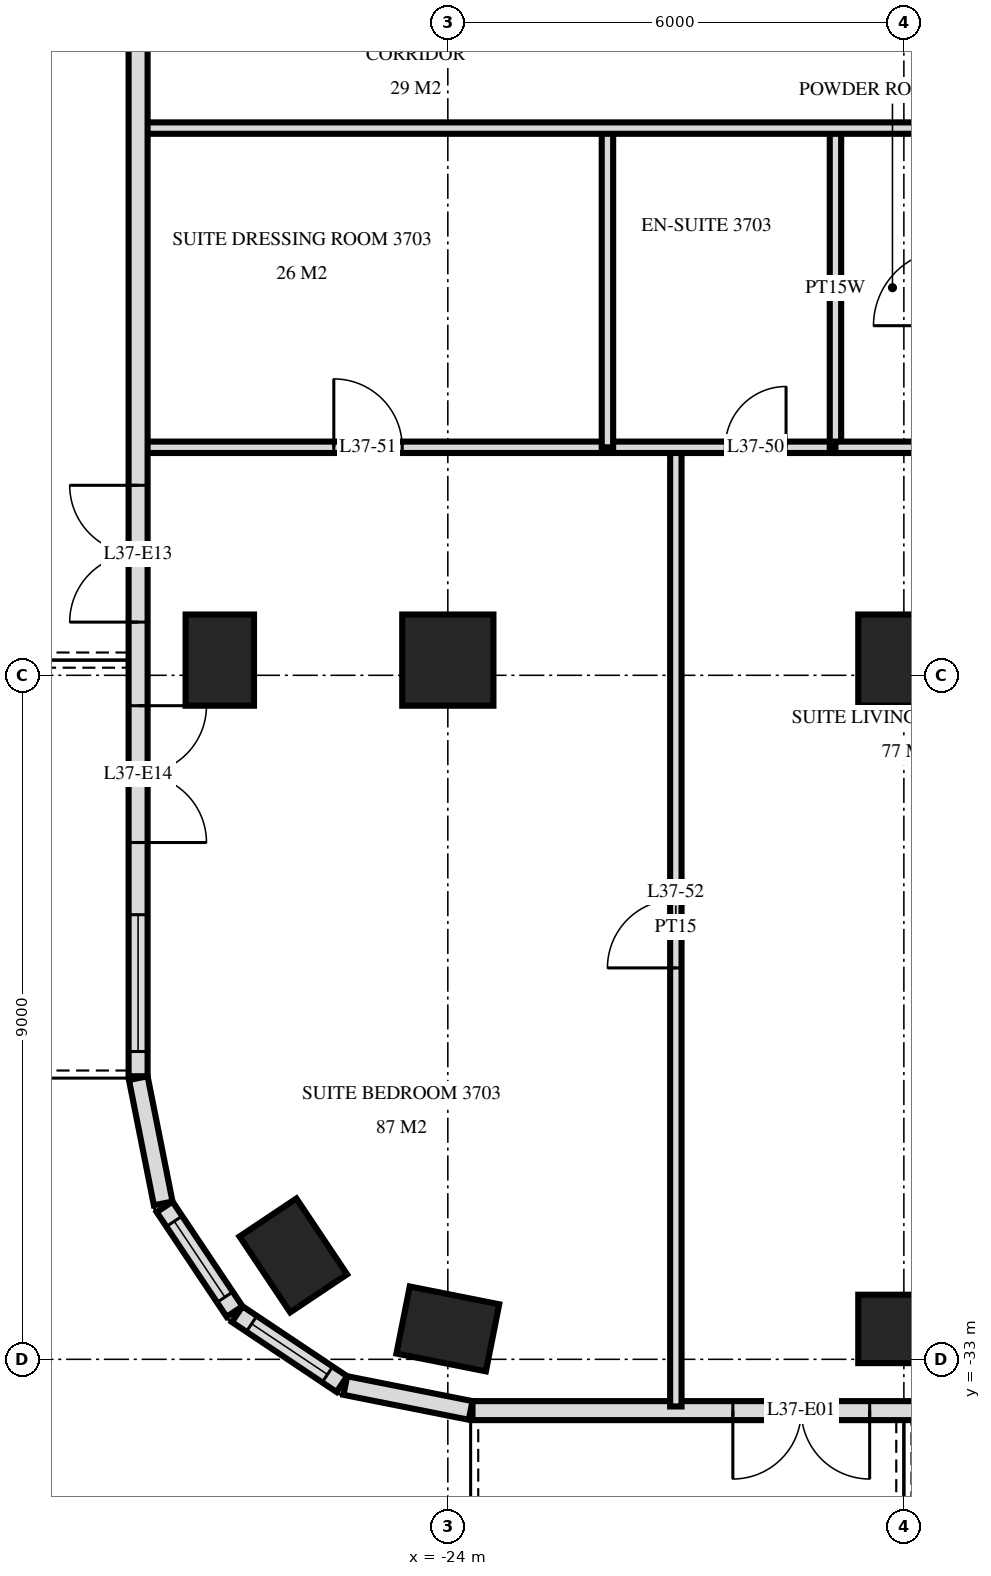
"""IFC4 building model, lengths in metres.
Left out: names, types, materials, properties, quantities, classifications, styles, units other than length and angle.
Written with IfcOpenShell. Run it as: python <this file> out.ifc"""

import sys

from ifc_helpers import new_model, si_unit, direction, frame, frame_2d, origin, origin_2d, place, context, subcontext, project, spatial, rectangle, extrude, element, fill, save


model = new_model("IFC4")
c1 = context("Model", 3, precision=1e-05, world=origin(), true_north=direction((0.0, 1.0)))
c2 = subcontext(c1, "Body", "Model", "MODEL_VIEW")
j1 = project(units=[si_unit("LENGTHUNIT", "METRE"), si_unit("PLANEANGLEUNIT", "RADIAN")], contexts=[c1])
p1 = place(None, origin())
s1 = spatial("IfcSite", under=j1, at=p1, CompositionType="ELEMENT")
p2 = place(p1, origin())
s2 = spatial("IfcBuilding", under=s1, at=p2, CompositionType="ELEMENT")
p3 = place(p2, frame((0.0, 0.0, 145.2)))
s3 = spatial("IfcBuildingStorey", under=s2, at=p3, CompositionType="ELEMENT", Elevation=145.2)
for number, where, z_axis, x_axis in (
    (1, (-27.0, -23.8, 0.0), (0.0, 0.0, 1.0), (0.0, 1.0, 0.0)),
    (2, (-26.033, -31.633, 0.0), (0.0, 0.0, 1.0), (-0.556, 0.831, 0.0)),
    (3, (-24.0, -32.6, 0.0), (0.0, 0.0, 1.0), (-0.981, 0.195, 0.0)),
):
    element("IfcColumn", number, at=place(p3, frame(where, z_axis=z_axis, x_axis=x_axis)), inside=s3, PredefinedType="COLUMN", context=c2, shape_type="SweptSolid", body=[
        extrude(rectangle(XDim=1.2, YDim=0.9, at=origin_2d()), origin(), (0.0, 0.0, 1.0), 3.6),
    ])
p4 = place(p3, frame((-24.0, -23.8, 0.0), z_axis=(0.0, 0.0, 1.0), x_axis=(1.0, 0.0, 0.0)))
e4 = element("IfcColumn", 4, at=p4, inside=s3, PredefinedType="COLUMN", context=c2, shape_type="SweptSolid", body=[
    extrude(rectangle(XDim=1.2, YDim=1.2, at=origin_2d()), origin(), (0.0, 0.0, 1.0), 3.6),
])
p5 = place(p3, frame((-18.0, -32.6, 0.0), z_axis=(0.0, 0.0, 1.0), x_axis=(1.0, 0.0, 0.0)))
e5 = element("IfcColumn", 5, at=p5, inside=s3, PredefinedType="COLUMN", context=c2, shape_type="SweptSolid", body=[
    extrude(rectangle(XDim=1.2, YDim=0.9, at=origin_2d()), origin(), (0.0, 0.0, 1.0), 3.6),
])
p6 = place(p3, frame((-18.0, -23.8, 0.0), z_axis=(0.0, 0.0, 1.0), x_axis=(1.0, 0.0, 0.0)))
e6 = element("IfcColumn", 6, at=p6, inside=s3, PredefinedType="COLUMN", context=c2, shape_type="SweptSolid", body=[
    extrude(rectangle(XDim=1.2, YDim=1.2, at=origin_2d()), origin(), (0.0, 0.0, 1.0), 3.6),
])
p7 = place(p3, frame((-28.075, -3.325, 0.0), z_axis=(0.0, 0.0, 1.0), x_axis=(0.0, -1.0, 0.0)))
e7 = element("IfcWall", 7, at=p7, inside=s3, PredefinedType="SOLIDWALL", context=c2, shape_type="SweptSolid", body=[
    extrude(rectangle(XDim=25.951, YDim=0.25, at=frame_2d((12.975, 0.0))), origin(), (0.0, 0.0, 1.0), 3.32),
])
p8 = place(p7, frame((7.275, 0.0, 0.0)))
e8 = element("IfcOpeningElement", 8, at=p8, cuts=e7, PredefinedType="OPENING", context=c2, shape_type="SweptSolid", body=[
    extrude(rectangle(XDim=1.8, YDim=2.4, at=frame_2d((0.9, 1.2))), frame((0.0, 0.135, 0.0), z_axis=(0.0, -1.0, 0.0), x_axis=(1.0, 0.0, 0.0)), (0.0, 0.0, 1.0), 0.27),
])
p9 = place(p7, frame((18.175, 0.0, 0.0)))
e9 = element("IfcOpeningElement", 9, at=p9, cuts=e7, PredefinedType="OPENING", context=c2, shape_type="SweptSolid", body=[
    extrude(rectangle(XDim=1.8, YDim=2.4, at=frame_2d((0.9, 1.2))), frame((0.0, 0.135, 0.0), z_axis=(0.0, -1.0, 0.0), x_axis=(1.0, 0.0, 0.0)), (0.0, 0.0, 1.0), 0.27),
])
p10 = place(p7, frame((21.075, 0.0, 0.0)))
e10 = element("IfcOpeningElement", 10, at=p10, cuts=e7, PredefinedType="OPENING", context=c2, shape_type="SweptSolid", body=[
    extrude(rectangle(XDim=1.8, YDim=2.4, at=frame_2d((0.9, 1.2))), frame((0.0, 0.135, 0.0), z_axis=(0.0, -1.0, 0.0), x_axis=(1.0, 0.0, 0.0)), (0.0, 0.0, 1.0), 0.27),
])
p11 = place(p7, frame((23.825, 0.0, 0.3)))
e11 = element("IfcOpeningElement", 11, at=p11, cuts=e7, PredefinedType="OPENING", context=c2, shape_type="SweptSolid", body=[
    extrude(rectangle(XDim=1.8, YDim=2.1, at=frame_2d((0.9, 1.05))), frame((0.0, 0.135, 0.0), z_axis=(0.0, -1.0, 0.0), x_axis=(1.0, 0.0, 0.0)), (0.0, 0.0, 1.0), 0.27),
])
p12 = place(p3, frame((-28.073, -29.3, 0.0), z_axis=(0.0, 0.0, 1.0), x_axis=(0.194999110559, -0.980803419081, 0.0)))
e12 = element("IfcWall", 12, at=p12, inside=s3, PredefinedType="SOLIDWALL", context=c2, shape_type="SweptSolid", body=[
    extrude(rectangle(XDim=1.681, YDim=0.25, at=frame_2d((0.841, 0.0))), origin(), (0.0, 0.0, 1.0), 3.32),
])
p13 = place(p3, frame((-27.726, -30.994, 0.0), z_axis=(0.0, 0.0, 1.0), x_axis=(0.55555029066, -0.831482937015, 0.0)))
e13 = element("IfcWall", 13, at=p13, inside=s3, PredefinedType="SOLIDWALL", context=c2, shape_type="SweptSolid", body=[
    extrude(rectangle(XDim=1.656, YDim=0.25, at=frame_2d((0.828, 0.0))), origin(), (0.0, 0.0, 1.0), 3.32),
])
p14 = place(p13, frame((0.228, 0.0, 0.9)))
e14 = element("IfcOpeningElement", 14, at=p14, cuts=e13, PredefinedType="OPENING", context=c2, shape_type="SweptSolid", body=[
    extrude(rectangle(XDim=1.2, YDim=1.5, at=frame_2d((0.6, 0.75))), frame((0.0, 0.135, 0.0), z_axis=(0.0, -1.0, 0.0), x_axis=(1.0, 0.0, 0.0)), (0.0, 0.0, 1.0), 0.27),
])
p15 = place(p3, frame((-26.771, -32.406, 0.0), z_axis=(0.0, 0.0, 1.0), x_axis=(0.831482937015, -0.55555029066, 0.0)))
e15 = element("IfcWall", 15, at=p15, inside=s3, PredefinedType="SOLIDWALL", context=c2, shape_type="SweptSolid", body=[
    extrude(rectangle(XDim=1.656, YDim=0.25, at=frame_2d((0.828, 0.0))), origin(), (0.0, 0.0, 1.0), 3.32),
])
p16 = place(p15, frame((0.228, 0.0, 0.9)))
e16 = element("IfcOpeningElement", 16, at=p16, cuts=e15, PredefinedType="OPENING", context=c2, shape_type="SweptSolid", body=[
    extrude(rectangle(XDim=1.2, YDim=1.5, at=frame_2d((0.6, 0.75))), frame((0.0, 0.135, 0.0), z_axis=(0.0, -1.0, 0.0), x_axis=(1.0, 0.0, 0.0)), (0.0, 0.0, 1.0), 0.27),
])
p17 = place(p3, frame((-25.349, -33.344, 0.0), z_axis=(0.0, 0.0, 1.0), x_axis=(0.980775640221, -0.19513878023, 0.0)))
e17 = element("IfcWall", 17, at=p17, inside=s3, PredefinedType="SOLIDWALL", context=c2, shape_type="SweptSolid", body=[
    extrude(rectangle(XDim=1.681, YDim=0.25, at=frame_2d((0.841, 0.0))), origin(), (0.0, 0.0, 1.0), 3.32),
])
p18 = place(p3, frame((-23.675, -33.675, 0.0), z_axis=(0.0, 0.0, 1.0), x_axis=(1.0, 0.0, 0.0)))
e18 = element("IfcWall", 18, at=p18, inside=s3, PredefinedType="SOLIDWALL", context=c2, shape_type="SweptSolid", body=[
    extrude(rectangle(XDim=47.351, YDim=0.25, at=frame_2d((23.675, 0.0))), origin(), (0.0, 0.0, 1.0), 3.32),
])
p19 = place(p18, frame((3.425, 0.0, 0.0)))
e19 = element("IfcOpeningElement", 19, at=p19, cuts=e18, PredefinedType="OPENING", context=c2, shape_type="SweptSolid", body=[
    extrude(rectangle(XDim=1.8, YDim=2.4, at=frame_2d((0.9, 1.2))), frame((0.0, 0.135, 0.0), z_axis=(0.0, -1.0, 0.0), x_axis=(1.0, 0.0, 0.0)), (0.0, 0.0, 1.0), 0.27),
])
p20 = place(p18, frame((6.275, 0.0, 0.0)))
e20 = element("IfcOpeningElement", 20, at=p20, cuts=e18, PredefinedType="OPENING", context=c2, shape_type="SweptSolid", body=[
    extrude(rectangle(XDim=1.8, YDim=2.4, at=frame_2d((0.9, 1.2))), frame((0.0, 0.135, 0.0), z_axis=(0.0, -1.0, 0.0), x_axis=(1.0, 0.0, 0.0)), (0.0, 0.0, 1.0), 0.27),
])
p21 = place(p18, frame((8.975, 0.0, 0.3)))
e21 = element("IfcOpeningElement", 21, at=p21, cuts=e18, PredefinedType="OPENING", context=c2, shape_type="SweptSolid", body=[
    extrude(rectangle(XDim=2.4, YDim=2.1, at=frame_2d((1.2, 1.05))), frame((0.0, 0.135, 0.0), z_axis=(0.0, -1.0, 0.0), x_axis=(1.0, 0.0, 0.0)), (0.0, 0.0, 1.0), 0.27),
])
p22 = place(p18, frame((12.275, 0.0, 0.0)))
e22 = element("IfcOpeningElement", 22, at=p22, cuts=e18, PredefinedType="OPENING", context=c2, shape_type="SweptSolid", body=[
    extrude(rectangle(XDim=1.8, YDim=2.4, at=frame_2d((0.9, 1.2))), frame((0.0, 0.135, 0.0), z_axis=(0.0, -1.0, 0.0), x_axis=(1.0, 0.0, 0.0)), (0.0, 0.0, 1.0), 0.27),
])
p23 = place(p18, frame((14.975, 0.0, 0.3)))
e23 = element("IfcOpeningElement", 23, at=p23, cuts=e18, PredefinedType="OPENING", context=c2, shape_type="SweptSolid", body=[
    extrude(rectangle(XDim=2.4, YDim=2.1, at=frame_2d((1.2, 1.05))), frame((0.0, 0.135, 0.0), z_axis=(0.0, -1.0, 0.0), x_axis=(1.0, 0.0, 0.0)), (0.0, 0.0, 1.0), 0.27),
])
p24 = place(p18, frame((21.275, 0.0, 0.0)))
e24 = element("IfcOpeningElement", 24, at=p24, cuts=e18, PredefinedType="OPENING", context=c2, shape_type="SweptSolid", body=[
    extrude(rectangle(XDim=1.8, YDim=2.4, at=frame_2d((0.9, 1.2))), frame((0.0, 0.135, 0.0), z_axis=(0.0, -1.0, 0.0), x_axis=(1.0, 0.0, 0.0)), (0.0, 0.0, 1.0), 0.27),
])
p25 = place(p18, frame((24.275, 0.0, 0.0)))
e25 = element("IfcOpeningElement", 25, at=p25, cuts=e18, PredefinedType="OPENING", context=c2, shape_type="SweptSolid", body=[
    extrude(rectangle(XDim=1.8, YDim=2.4, at=frame_2d((0.9, 1.2))), frame((0.0, 0.135, 0.0), z_axis=(0.0, -1.0, 0.0), x_axis=(1.0, 0.0, 0.0)), (0.0, 0.0, 1.0), 0.27),
])
p26 = place(p18, frame((30.275, 0.0, 0.0)))
e26 = element("IfcOpeningElement", 26, at=p26, cuts=e18, PredefinedType="OPENING", context=c2, shape_type="SweptSolid", body=[
    extrude(rectangle(XDim=1.8, YDim=2.4, at=frame_2d((0.9, 1.2))), frame((0.0, 0.135, 0.0), z_axis=(0.0, -1.0, 0.0), x_axis=(1.0, 0.0, 0.0)), (0.0, 0.0, 1.0), 0.27),
])
p27 = place(p18, frame((32.975, 0.0, 0.3)))
e27 = element("IfcOpeningElement", 27, at=p27, cuts=e18, PredefinedType="OPENING", context=c2, shape_type="SweptSolid", body=[
    extrude(rectangle(XDim=2.4, YDim=2.1, at=frame_2d((1.2, 1.05))), frame((0.0, 0.135, 0.0), z_axis=(0.0, -1.0, 0.0), x_axis=(1.0, 0.0, 0.0)), (0.0, 0.0, 1.0), 0.27),
])
p28 = place(p18, frame((36.275, 0.0, 0.0)))
e28 = element("IfcOpeningElement", 28, at=p28, cuts=e18, PredefinedType="OPENING", context=c2, shape_type="SweptSolid", body=[
    extrude(rectangle(XDim=1.8, YDim=2.4, at=frame_2d((0.9, 1.2))), frame((0.0, 0.135, 0.0), z_axis=(0.0, -1.0, 0.0), x_axis=(1.0, 0.0, 0.0)), (0.0, 0.0, 1.0), 0.27),
])
p29 = place(p18, frame((38.975, 0.0, 0.3)))
e29 = element("IfcOpeningElement", 29, at=p29, cuts=e18, PredefinedType="OPENING", context=c2, shape_type="SweptSolid", body=[
    extrude(rectangle(XDim=2.4, YDim=2.1, at=frame_2d((1.2, 1.05))), frame((0.0, 0.135, 0.0), z_axis=(0.0, -1.0, 0.0), x_axis=(1.0, 0.0, 0.0)), (0.0, 0.0, 1.0), 0.27),
])
p30 = place(p18, frame((42.275, 0.0, 0.0)))
e30 = element("IfcOpeningElement", 30, at=p30, cuts=e18, PredefinedType="OPENING", context=c2, shape_type="SweptSolid", body=[
    extrude(rectangle(XDim=1.8, YDim=2.4, at=frame_2d((0.9, 1.2))), frame((0.0, 0.135, 0.0), z_axis=(0.0, -1.0, 0.0), x_axis=(1.0, 0.0, 0.0)), (0.0, 0.0, 1.0), 0.27),
])
p31 = place(p18, frame((45.125, 0.0, 0.3)))
e31 = element("IfcOpeningElement", 31, at=p31, cuts=e18, PredefinedType="OPENING", context=c2, shape_type="SweptSolid", body=[
    extrude(rectangle(XDim=1.8, YDim=2.1, at=frame_2d((0.9, 1.05))), frame((0.0, 0.135, 0.0), z_axis=(0.0, -1.0, 0.0), x_axis=(1.0, 0.0, 0.0)), (0.0, 0.0, 1.0), 0.27),
])
p32 = place(p3, frame((-18.9, -21.0, 0.0), z_axis=(0.0, 0.0, 1.0), x_axis=(0.0, 1.0, 0.0)))
e32 = element("IfcWall", 32, at=p32, inside=s3, PredefinedType="PLUMBINGWALL", context=c2, shape_type="SweptSolid", body=[
    extrude(rectangle(XDim=4.2, YDim=0.15, at=frame_2d((2.1, 0.0))), origin(), (0.0, 0.0, 1.0), 3.32),
])
p33 = place(p3, frame((-21.0, -33.62, 0.0), z_axis=(0.0, 0.0, 1.0), x_axis=(0.0, 1.0, 0.0)))
e33 = element("IfcWall", 33, at=p33, inside=s3, PredefinedType="PARTITIONING", context=c2, shape_type="SweptSolid", body=[
    extrude(rectangle(XDim=12.62, YDim=0.15, at=frame_2d((6.31, 0.0))), origin(), (0.0, 0.0, 1.0), 3.32),
])
p34 = place(p33, frame((5.77, 0.0, 0.0)))
e34 = element("IfcOpeningElement", 34, at=p34, cuts=e33, PredefinedType="OPENING", context=c2, shape_type="SweptSolid", body=[
    extrude(rectangle(XDim=0.9, YDim=2.1, at=frame_2d((0.45, 1.05))), frame((0.0, 0.085, 0.0), z_axis=(0.0, -1.0, 0.0), x_axis=(1.0, 0.0, 0.0)), (0.0, 0.0, 1.0), 0.17),
])
p35 = place(p3, frame((-21.9, -21.0, 0.0), z_axis=(0.0, 0.0, 1.0), x_axis=(0.0, 1.0, 0.0)))
e35 = element("IfcWall", 35, at=p35, inside=s3, PredefinedType="PARTITIONING", context=c2, shape_type="SweptSolid", body=[
    extrude(rectangle(XDim=4.2, YDim=0.15, at=frame_2d((2.1, 0.0))), origin(), (0.0, 0.0, 1.0), 3.32),
])
p36 = place(p3, frame((-28.02, -21.0, 0.0), z_axis=(0.0, 0.0, 1.0), x_axis=(1.0, 0.0, 0.0)))
e36 = element("IfcWall", 36, at=p36, inside=s3, PredefinedType="PARTITIONING", context=c2, shape_type="SweptSolid", body=[
    extrude(rectangle(XDim=9.12, YDim=0.15, at=frame_2d((4.56, 0.0))), origin(), (0.0, 0.0, 1.0), 3.32),
])
p37 = place(p36, frame((7.67, 0.0, 0.0)))
e37 = element("IfcOpeningElement", 37, at=p37, cuts=e36, PredefinedType="OPENING", context=c2, shape_type="SweptSolid", body=[
    extrude(rectangle(XDim=0.8, YDim=2.1, at=frame_2d((0.4, 1.05))), frame((0.0, 0.085, 0.0), z_axis=(0.0, -1.0, 0.0), x_axis=(1.0, 0.0, 0.0)), (0.0, 0.0, 1.0), 0.17),
])
p38 = place(p36, frame((2.52, 0.0, 0.0)))
e38 = element("IfcOpeningElement", 38, at=p38, cuts=e36, PredefinedType="OPENING", context=c2, shape_type="SweptSolid", body=[
    extrude(rectangle(XDim=0.9, YDim=2.1, at=frame_2d((0.45, 1.05))), frame((0.0, 0.085, 0.0), z_axis=(0.0, -1.0, 0.0), x_axis=(1.0, 0.0, 0.0)), (0.0, 0.0, 1.0), 0.17),
])
p39 = place(p3, frame((-18.9, -21.0, 0.0), z_axis=(0.0, 0.0, 1.0), x_axis=(1.0, 0.0, 0.0)))
e39 = element("IfcWall", 39, at=p39, inside=s3, PredefinedType="PLUMBINGWALL", context=c2, shape_type="SweptSolid", body=[
    extrude(rectangle(XDim=1.5, YDim=0.15, at=frame_2d((0.75, 0.0))), origin(), (0.0, 0.0, 1.0), 3.32),
])
p40 = place(p3, frame((-28.02, -16.8, 0.0), z_axis=(0.0, 0.0, 1.0), x_axis=(1.0, 0.0, 0.0)))
e40 = element("IfcWall", 40, at=p40, inside=s3, PredefinedType="PARTITIONING", context=c2, shape_type="SweptSolid", body=[
    extrude(rectangle(XDim=56.04, YDim=0.15, at=frame_2d((28.02, 0.0))), origin(), (0.0, 0.0, 1.0), 3.32),
])
p41 = place(p40, frame((13.17, 0.0, 0.0)))
e41 = element("IfcOpeningElement", 41, at=p41, cuts=e40, PredefinedType="OPENING", context=c2, shape_type="SweptSolid", body=[
    extrude(rectangle(XDim=1.0, YDim=2.1, at=frame_2d((0.5, 1.05))), frame((0.0, 0.085, 0.0), z_axis=(0.0, -1.0, 0.0), x_axis=(1.0, 0.0, 0.0)), (0.0, 0.0, 1.0), 0.17),
])
p42 = place(p40, frame((11.32, 0.0, 0.0)))
e42 = element("IfcOpeningElement", 42, at=p42, cuts=e40, PredefinedType="OPENING", context=c2, shape_type="SweptSolid", body=[
    extrude(rectangle(XDim=1.0, YDim=2.1, at=frame_2d((0.5, 1.05))), frame((0.0, 0.085, 0.0), z_axis=(0.0, -1.0, 0.0), x_axis=(1.0, 0.0, 0.0)), (0.0, 0.0, 1.0), 0.17),
])
p43 = place(p40, frame((41.87, 0.0, 0.0)))
e43 = element("IfcOpeningElement", 43, at=p43, cuts=e40, PredefinedType="OPENING", context=c2, shape_type="SweptSolid", body=[
    extrude(rectangle(XDim=1.0, YDim=2.1, at=frame_2d((0.5, 1.05))), frame((0.0, 0.085, 0.0), z_axis=(0.0, -1.0, 0.0), x_axis=(1.0, 0.0, 0.0)), (0.0, 0.0, 1.0), 0.17),
])
p44 = place(p40, frame((43.72, 0.0, 0.0)))
e44 = element("IfcOpeningElement", 44, at=p44, cuts=e40, PredefinedType="OPENING", context=c2, shape_type="SweptSolid", body=[
    extrude(rectangle(XDim=1.0, YDim=2.1, at=frame_2d((0.5, 1.05))), frame((0.0, 0.085, 0.0), z_axis=(0.0, -1.0, 0.0), x_axis=(1.0, 0.0, 0.0)), (0.0, 0.0, 1.0), 0.17),
])
p45 = place(p40, frame((19.52, 0.0, 0.0)))
e45 = element("IfcOpeningElement", 45, at=p45, cuts=e40, PredefinedType="OPENING", context=c2, shape_type="SweptSolid", body=[
    extrude(rectangle(XDim=1.0, YDim=2.1, at=frame_2d((0.5, 1.05))), frame((0.0, 0.085, 0.0), z_axis=(0.0, -1.0, 0.0), x_axis=(1.0, 0.0, 0.0)), (0.0, 0.0, 1.0), 0.17),
])
p46 = place(p40, frame((27.52, 0.0, 0.0)))
e46 = element("IfcOpeningElement", 46, at=p46, cuts=e40, PredefinedType="OPENING", context=c2, shape_type="SweptSolid", body=[
    extrude(rectangle(XDim=1.0, YDim=2.1, at=frame_2d((0.5, 1.05))), frame((0.0, 0.085, 0.0), z_axis=(0.0, -1.0, 0.0), x_axis=(1.0, 0.0, 0.0)), (0.0, 0.0, 1.0), 0.17),
])
p47 = place(p40, frame((35.52, 0.0, 0.0)))
e47 = element("IfcOpeningElement", 47, at=p47, cuts=e40, PredefinedType="OPENING", context=c2, shape_type="SweptSolid", body=[
    extrude(rectangle(XDim=1.0, YDim=2.1, at=frame_2d((0.5, 1.05))), frame((0.0, 0.085, 0.0), z_axis=(0.0, -1.0, 0.0), x_axis=(1.0, 0.0, 0.0)), (0.0, 0.0, 1.0), 0.17),
])
p48 = place(p14, origin())
e48 = element("IfcWindow", 48, at=p48, inside=s3, PartitioningType="SINGLE_PANEL", PredefinedType="WINDOW", context=c2, shape_type="SweptSolid", body=[
    extrude(rectangle(XDim=1.2, YDim=1.5, at=frame_2d((0.6, 0.75))), frame((0.0, 0.03, 0.0), z_axis=(0.0, -1.0, 0.0), x_axis=(1.0, 0.0, 0.0)), (0.0, 0.0, 1.0), 0.06),
])
fill(e14, e48)
p49 = place(p16, origin())
e49 = element("IfcWindow", 49, at=p49, inside=s3, PartitioningType="SINGLE_PANEL", PredefinedType="WINDOW", context=c2, shape_type="SweptSolid", body=[
    extrude(rectangle(XDim=1.2, YDim=1.5, at=frame_2d((0.6, 0.75))), frame((0.0, 0.03, 0.0), z_axis=(0.0, -1.0, 0.0), x_axis=(1.0, 0.0, 0.0)), (0.0, 0.0, 1.0), 0.06),
])
fill(e16, e49)
p50 = place(p19, frame((0.9, 0.0, 0.0), z_axis=(0.0, 0.0, 1.0), x_axis=(-1.0, 0.0, 0.0)))
e50 = element("IfcDoor", 50, at=p50, inside=s3, OperationType="DOUBLE_DOOR_SINGLE_SWING", PredefinedType="DOOR", context=c2, shape_type="SweptSolid", body=[
    extrude(rectangle(XDim=1.8, YDim=2.4, at=frame_2d((0.0, 1.2))), frame((0.0, -0.025, 0.0), z_axis=(0.0, 1.0, 0.0), x_axis=(-1.0, 0.0, 0.0)), (0.0, 0.0, 1.0), 0.05),
])
fill(e19, e50)
p51 = place(p9, frame((0.9, 0.0, 0.0), z_axis=(0.0, 0.0, 1.0), x_axis=(-1.0, 0.0, 0.0)))
e51 = element("IfcDoor", 51, at=p51, inside=s3, OperationType="DOUBLE_DOOR_SINGLE_SWING", PredefinedType="DOOR", context=c2, shape_type="SweptSolid", body=[
    extrude(rectangle(XDim=1.8, YDim=2.4, at=frame_2d((0.0, 1.2))), frame((0.0, -0.025, 0.0), z_axis=(0.0, 1.0, 0.0), x_axis=(-1.0, 0.0, 0.0)), (0.0, 0.0, 1.0), 0.05),
])
fill(e9, e51)
p52 = place(p10, origin())
e52 = element("IfcDoor", 52, at=p52, inside=s3, OperationType="DOUBLE_DOOR_SINGLE_SWING", PredefinedType="DOOR", context=c2, shape_type="SweptSolid", body=[
    extrude(rectangle(XDim=1.8, YDim=2.4, at=frame_2d((0.9, 1.2))), frame((0.0, 0.025, 0.0), z_axis=(0.0, -1.0, 0.0), x_axis=(1.0, 0.0, 0.0)), (0.0, 0.0, 1.0), 0.05),
])
fill(e10, e52)
p53 = place(p11, origin())
e53 = element("IfcWindow", 53, at=p53, inside=s3, PartitioningType="SINGLE_PANEL", PredefinedType="WINDOW", context=c2, shape_type="SweptSolid", body=[
    extrude(rectangle(XDim=1.8, YDim=2.1, at=frame_2d((0.9, 1.05))), frame((0.0, 0.03, 0.0), z_axis=(0.0, -1.0, 0.0), x_axis=(1.0, 0.0, 0.0)), (0.0, 0.0, 1.0), 0.06),
])
fill(e11, e53)
p54 = place(p37, origin())
e54 = element("IfcDoor", 54, at=p54, inside=s3, OperationType="SINGLE_SWING_LEFT", PredefinedType="DOOR", context=c2, shape_type="SweptSolid", body=[
    extrude(rectangle(XDim=0.8, YDim=2.1, at=frame_2d((0.4, 1.05))), frame((0.0, 0.025, 0.0), z_axis=(0.0, -1.0, 0.0), x_axis=(1.0, 0.0, 0.0)), (0.0, 0.0, 1.0), 0.05),
])
fill(e37, e54)
p55 = place(p38, origin())
e55 = element("IfcDoor", 55, at=p55, inside=s3, OperationType="SINGLE_SWING_RIGHT", PredefinedType="DOOR", context=c2, shape_type="SweptSolid", body=[
    extrude(rectangle(XDim=0.9, YDim=2.1, at=frame_2d((0.45, 1.05))), frame((0.0, 0.025, 0.0), z_axis=(0.0, -1.0, 0.0), x_axis=(1.0, 0.0, 0.0)), (0.0, 0.0, 1.0), 0.05),
])
fill(e38, e55)
p56 = place(p34, origin())
e56 = element("IfcDoor", 56, at=p56, inside=s3, OperationType="SINGLE_SWING_RIGHT", PredefinedType="DOOR", context=c2, shape_type="SweptSolid", body=[
    extrude(rectangle(XDim=0.9, YDim=2.1, at=frame_2d((0.45, 1.05))), frame((0.0, 0.025, 0.0), z_axis=(0.0, -1.0, 0.0), x_axis=(1.0, 0.0, 0.0)), (0.0, 0.0, 1.0), 0.05),
])
fill(e34, e56)
save(model, sys.argv[1])
